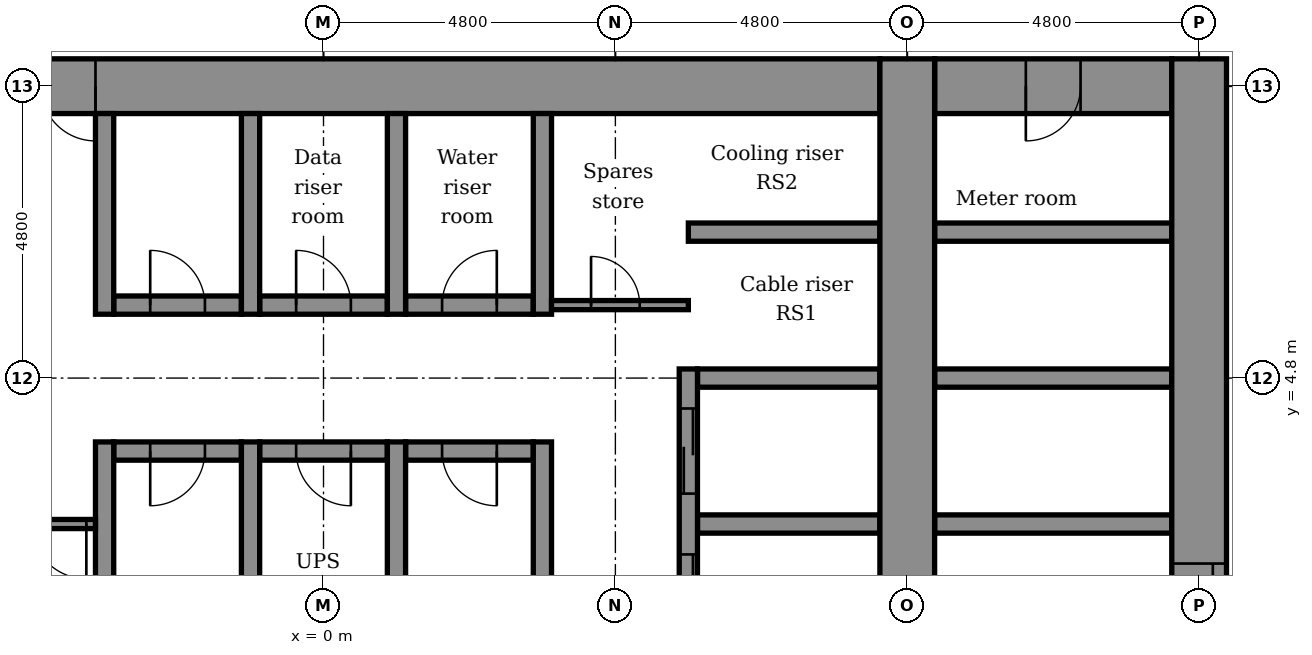
"""IFC4 building model, lengths in metres.
Left out: names, types, materials, properties, quantities, classifications, styles, units other than length and angle.
Written with IfcOpenShell. Run it as: python <this file> out.ifc"""

import sys

from ifc_helpers import new_model, si_unit, direction, frame, frame_2d, origin, place, context, subcontext, project, spatial, rectangle, extrude, element, fill, save


model = new_model("IFC4")
c1 = context("Model", 3, precision=1e-05, world=origin(), true_north=direction((0.0, 1.0)))
c2 = subcontext(c1, "Body", "Model", "MODEL_VIEW")
j1 = project(units=[si_unit("LENGTHUNIT", "METRE"), si_unit("PLANEANGLEUNIT", "RADIAN")], contexts=[c1])
p1 = place(None, origin())
s1 = spatial("IfcSite", under=j1, at=p1, CompositionType="ELEMENT")
p2 = place(p1, origin())
s2 = spatial("IfcBuilding", under=s1, at=p2, CompositionType="ELEMENT")
p3 = place(p2, frame((0.0, 0.0, 113.9)))
s3 = spatial("IfcBuildingStorey", under=s2, at=p3, CompositionType="ELEMENT", Elevation=113.9)
p4 = place(p3, frame((6.15, 2.4, -0.2), z_axis=(0.0, 0.0, 1.0), x_axis=(1.0, 0.0, 0.0)))
e1 = element("IfcWall", 1, at=p4, inside=s3, PredefinedType="STANDARD", context=c2, shape_type="SweptSolid", body=[
    extrude(rectangle(XDim=3.0, YDim=0.3, at=frame_2d((1.5, 0.0))), origin(), (0.0, 0.0, 1.0), 4.5),
])
p5 = place(p3, frame((10.05, 2.4, -0.2), z_axis=(0.0, 0.0, 1.0), x_axis=(1.0, 0.0, 0.0)))
e2 = element("IfcWall", 2, at=p5, inside=s3, PredefinedType="STANDARD", context=c2, shape_type="SweptSolid", body=[
    extrude(rectangle(XDim=3.9, YDim=0.3, at=frame_2d((1.95, 0.0))), origin(), (0.0, 0.0, 1.0), 4.5),
])
p6 = place(p3, frame((-3.45, 3.6, -0.2), z_axis=(0.0, 0.0, 1.0), x_axis=(1.0, 0.0, 0.0)))
e3 = element("IfcWall", 3, at=p6, inside=s3, PredefinedType="STANDARD", context=c2, shape_type="SweptSolid", body=[
    extrude(rectangle(XDim=2.1, YDim=0.3, at=frame_2d((1.05, 0.0))), origin(), (0.0, 0.0, 1.0), 4.5),
])
p7 = place(p6, frame((0.6, 0.0, 0.2)))
e4 = element("IfcOpeningElement", 4, at=p7, cuts=e3, PredefinedType="OPENING", context=c2, shape_type="SweptSolid", body=[
    extrude(rectangle(XDim=0.9, YDim=2.1, at=frame_2d((0.45, 1.05))), frame((0.0, 0.16, 0.0), z_axis=(0.0, -1.0, 0.0), x_axis=(1.0, 0.0, 0.0)), (0.0, 0.0, 1.0), 0.32),
])
p8 = place(p3, frame((-1.05, 3.6, -0.2), z_axis=(0.0, 0.0, 1.0), x_axis=(1.0, 0.0, 0.0)))
e5 = element("IfcWall", 5, at=p8, inside=s3, PredefinedType="STANDARD", context=c2, shape_type="SweptSolid", body=[
    extrude(rectangle(XDim=2.1, YDim=0.3, at=frame_2d((1.05, 0.0))), origin(), (0.0, 0.0, 1.0), 4.5),
])
p9 = place(p8, frame((0.6, 0.0, 0.2)))
e6 = element("IfcOpeningElement", 6, at=p9, cuts=e5, PredefinedType="OPENING", context=c2, shape_type="SweptSolid", body=[
    extrude(rectangle(XDim=0.9, YDim=2.1, at=frame_2d((0.45, 1.05))), frame((0.0, 0.16, 0.0), z_axis=(0.0, -1.0, 0.0), x_axis=(1.0, 0.0, 0.0)), (0.0, 0.0, 1.0), 0.32),
])
p10 = place(p3, frame((1.35, 3.6, -0.2), z_axis=(0.0, 0.0, 1.0), x_axis=(1.0, 0.0, 0.0)))
e7 = element("IfcWall", 7, at=p10, inside=s3, PredefinedType="STANDARD", context=c2, shape_type="SweptSolid", body=[
    extrude(rectangle(XDim=2.1, YDim=0.3, at=frame_2d((1.05, 0.0))), origin(), (0.0, 0.0, 1.0), 4.5),
])
p11 = place(p10, frame((0.6, 0.0, 0.2)))
e8 = element("IfcOpeningElement", 8, at=p11, cuts=e7, PredefinedType="OPENING", context=c2, shape_type="SweptSolid", body=[
    extrude(rectangle(XDim=0.9, YDim=2.1, at=frame_2d((0.45, 1.05))), frame((0.0, 0.16, 0.0), z_axis=(0.0, -1.0, 0.0), x_axis=(1.0, 0.0, 0.0)), (0.0, 0.0, 1.0), 0.32),
])
p12 = place(p3, frame((6.15, 4.8, -0.2), z_axis=(0.0, 0.0, 1.0), x_axis=(1.0, 0.0, 0.0)))
e9 = element("IfcWall", 9, at=p12, inside=s3, PredefinedType="STANDARD", context=c2, shape_type="SweptSolid", body=[
    extrude(rectangle(XDim=3.0, YDim=0.3, at=frame_2d((1.5, 0.0))), origin(), (0.0, 0.0, 1.0), 4.5),
])
p13 = place(p3, frame((10.05, 4.8, -0.2), z_axis=(0.0, 0.0, 1.0), x_axis=(1.0, 0.0, 0.0)))
e10 = element("IfcWall", 10, at=p13, inside=s3, PredefinedType="STANDARD", context=c2, shape_type="SweptSolid", body=[
    extrude(rectangle(XDim=3.9, YDim=0.3, at=frame_2d((1.95, 0.0))), origin(), (0.0, 0.0, 1.0), 4.5),
])
p14 = place(p3, frame((-3.45, 6.0, -0.2), z_axis=(0.0, 0.0, 1.0), x_axis=(1.0, 0.0, 0.0)))
e11 = element("IfcWall", 11, at=p14, inside=s3, PredefinedType="STANDARD", context=c2, shape_type="SweptSolid", body=[
    extrude(rectangle(XDim=2.1, YDim=0.3, at=frame_2d((1.05, 0.0))), origin(), (0.0, 0.0, 1.0), 4.5),
])
p15 = place(p14, frame((0.6, 0.0, 0.2)))
e12 = element("IfcOpeningElement", 12, at=p15, cuts=e11, PredefinedType="OPENING", context=c2, shape_type="SweptSolid", body=[
    extrude(rectangle(XDim=0.9, YDim=2.1, at=frame_2d((0.45, 1.05))), frame((0.0, 0.16, 0.0), z_axis=(0.0, -1.0, 0.0), x_axis=(1.0, 0.0, 0.0)), (0.0, 0.0, 1.0), 0.32),
])
p16 = place(p3, frame((-1.05, 6.0, -0.2), z_axis=(0.0, 0.0, 1.0), x_axis=(1.0, 0.0, 0.0)))
e13 = element("IfcWall", 13, at=p16, inside=s3, PredefinedType="STANDARD", context=c2, shape_type="SweptSolid", body=[
    extrude(rectangle(XDim=2.1, YDim=0.3, at=frame_2d((1.05, 0.0))), origin(), (0.0, 0.0, 1.0), 4.5),
])
p17 = place(p16, frame((0.6, 0.0, 0.2)))
e14 = element("IfcOpeningElement", 14, at=p17, cuts=e13, PredefinedType="OPENING", context=c2, shape_type="SweptSolid", body=[
    extrude(rectangle(XDim=0.9, YDim=2.1, at=frame_2d((0.45, 1.05))), frame((0.0, 0.16, 0.0), z_axis=(0.0, -1.0, 0.0), x_axis=(1.0, 0.0, 0.0)), (0.0, 0.0, 1.0), 0.32),
])
p18 = place(p3, frame((1.35, 6.0, -0.2), z_axis=(0.0, 0.0, 1.0), x_axis=(1.0, 0.0, 0.0)))
e15 = element("IfcWall", 15, at=p18, inside=s3, PredefinedType="STANDARD", context=c2, shape_type="SweptSolid", body=[
    extrude(rectangle(XDim=2.1, YDim=0.3, at=frame_2d((1.05, 0.0))), origin(), (0.0, 0.0, 1.0), 4.5),
])
p19 = place(p18, frame((0.6, 0.0, 0.2)))
e16 = element("IfcOpeningElement", 16, at=p19, cuts=e15, PredefinedType="OPENING", context=c2, shape_type="SweptSolid", body=[
    extrude(rectangle(XDim=0.9, YDim=2.1, at=frame_2d((0.45, 1.05))), frame((0.0, 0.16, 0.0), z_axis=(0.0, -1.0, 0.0), x_axis=(1.0, 0.0, 0.0)), (0.0, 0.0, 1.0), 0.32),
])
p20 = place(p3, frame((6.0, 7.2, -0.2), z_axis=(0.0, 0.0, 1.0), x_axis=(1.0, 0.0, 0.0)))
e17 = element("IfcWall", 17, at=p20, inside=s3, PredefinedType="STANDARD", context=c2, shape_type="SweptSolid", body=[
    extrude(rectangle(XDim=3.15, YDim=0.3, at=frame_2d((1.575, 0.0))), origin(), (0.0, 0.0, 1.0), 4.5),
])
p21 = place(p3, frame((10.05, 7.2, -0.2), z_axis=(0.0, 0.0, 1.0), x_axis=(1.0, 0.0, 0.0)))
e18 = element("IfcWall", 18, at=p21, inside=s3, PredefinedType="STANDARD", context=c2, shape_type="SweptSolid", body=[
    extrude(rectangle(XDim=3.9, YDim=0.3, at=frame_2d((1.95, 0.0))), origin(), (0.0, 0.0, 1.0), 4.5),
])
p22 = place(p3, frame((-5.25, 9.6, -0.2), z_axis=(0.0, 0.0, 1.0), x_axis=(1.0, 0.0, 0.0)))
e19 = element("IfcWall", 19, at=p22, inside=s3, PredefinedType="SHEAR", context=c2, shape_type="SweptSolid", body=[
    extrude(rectangle(XDim=14.4, YDim=0.9, at=frame_2d((7.2, 0.0))), origin(), (0.0, 0.0, 1.0), 4.5),
])
p23 = place(p22, frame((0.6, 0.0, 0.2)))
e20 = element("IfcOpeningElement", 20, at=p23, cuts=e19, PredefinedType="OPENING", context=c2, shape_type="SweptSolid", body=[
    extrude(rectangle(XDim=0.9, YDim=2.1, at=frame_2d((0.45, 1.05))), frame((0.0, 0.46, 0.0), z_axis=(0.0, -1.0, 0.0), x_axis=(1.0, 0.0, 0.0)), (0.0, 0.0, 1.0), 0.92),
])
p24 = place(p3, frame((10.05, 9.6, -0.2), z_axis=(0.0, 0.0, 1.0), x_axis=(1.0, 0.0, 0.0)))
e21 = element("IfcWall", 21, at=p24, inside=s3, PredefinedType="SHEAR", context=c2, shape_type="SweptSolid", body=[
    extrude(rectangle(XDim=3.9, YDim=0.9, at=frame_2d((1.95, 0.0))), origin(), (0.0, 0.0, 1.0), 4.5),
])
p25 = place(p24, frame((1.5, 0.0, 0.2)))
e22 = element("IfcOpeningElement", 22, at=p25, cuts=e21, PredefinedType="OPENING", context=c2, shape_type="SweptSolid", body=[
    extrude(rectangle(XDim=0.9, YDim=2.1, at=frame_2d((0.45, 1.05))), frame((0.0, 0.46, 0.0), z_axis=(0.0, -1.0, 0.0), x_axis=(1.0, 0.0, 0.0)), (0.0, 0.0, 1.0), 0.92),
])
p26 = place(p3, frame((-3.6, -3.75, -0.2), z_axis=(0.0, 0.0, 1.0), x_axis=(0.0, 1.0, 0.0)))
e23 = element("IfcWall", 23, at=p26, inside=s3, PredefinedType="STANDARD", context=c2, shape_type="SweptSolid", body=[
    extrude(rectangle(XDim=7.5, YDim=0.3, at=frame_2d((3.75, 0.0))), origin(), (0.0, 0.0, 1.0), 4.5),
])
p27 = place(p3, frame((-3.6, 5.85, -0.2), z_axis=(0.0, 0.0, 1.0), x_axis=(0.0, 1.0, 0.0)))
e24 = element("IfcWall", 24, at=p27, inside=s3, PredefinedType="STANDARD", context=c2, shape_type="SweptSolid", body=[
    extrude(rectangle(XDim=3.3, YDim=0.3, at=frame_2d((1.65, 0.0))), origin(), (0.0, 0.0, 1.0), 4.5),
])
p28 = place(p3, frame((-1.2, -3.75, -0.2), z_axis=(0.0, 0.0, 1.0), x_axis=(0.0, 1.0, 0.0)))
e25 = element("IfcWall", 25, at=p28, inside=s3, PredefinedType="STANDARD", context=c2, shape_type="SweptSolid", body=[
    extrude(rectangle(XDim=7.5, YDim=0.3, at=frame_2d((3.75, 0.0))), origin(), (0.0, 0.0, 1.0), 4.5),
])
p29 = place(p3, frame((-1.2, 5.85, -0.2), z_axis=(0.0, 0.0, 1.0), x_axis=(0.0, 1.0, 0.0)))
e26 = element("IfcWall", 26, at=p29, inside=s3, PredefinedType="STANDARD", context=c2, shape_type="SweptSolid", body=[
    extrude(rectangle(XDim=3.3, YDim=0.3, at=frame_2d((1.65, 0.0))), origin(), (0.0, 0.0, 1.0), 4.5),
])
p30 = place(p3, frame((1.2, -3.75, -0.2), z_axis=(0.0, 0.0, 1.0), x_axis=(0.0, 1.0, 0.0)))
e27 = element("IfcWall", 27, at=p30, inside=s3, PredefinedType="STANDARD", context=c2, shape_type="SweptSolid", body=[
    extrude(rectangle(XDim=7.5, YDim=0.3, at=frame_2d((3.75, 0.0))), origin(), (0.0, 0.0, 1.0), 4.5),
])
p31 = place(p3, frame((1.2, 5.85, -0.2), z_axis=(0.0, 0.0, 1.0), x_axis=(0.0, 1.0, 0.0)))
e28 = element("IfcWall", 28, at=p31, inside=s3, PredefinedType="STANDARD", context=c2, shape_type="SweptSolid", body=[
    extrude(rectangle(XDim=3.3, YDim=0.3, at=frame_2d((1.65, 0.0))), origin(), (0.0, 0.0, 1.0), 4.5),
])
p32 = place(p3, frame((3.6, -3.75, -0.2), z_axis=(0.0, 0.0, 1.0), x_axis=(0.0, 1.0, 0.0)))
e29 = element("IfcWall", 29, at=p32, inside=s3, PredefinedType="STANDARD", context=c2, shape_type="SweptSolid", body=[
    extrude(rectangle(XDim=7.5, YDim=0.3, at=frame_2d((3.75, 0.0))), origin(), (0.0, 0.0, 1.0), 4.5),
])
p33 = place(p3, frame((3.6, 5.85, -0.2), z_axis=(0.0, 0.0, 1.0), x_axis=(0.0, 1.0, 0.0)))
e30 = element("IfcWall", 30, at=p33, inside=s3, PredefinedType="STANDARD", context=c2, shape_type="SweptSolid", body=[
    extrude(rectangle(XDim=3.3, YDim=0.3, at=frame_2d((1.65, 0.0))), origin(), (0.0, 0.0, 1.0), 4.5),
])
p34 = place(p3, frame((6.0, -2.55, -0.2), z_axis=(0.0, 0.0, 1.0), x_axis=(0.0, 1.0, 0.0)))
e31 = element("IfcWall", 31, at=p34, inside=s3, PredefinedType="STANDARD", context=c2, shape_type="SweptSolid", body=[
    extrude(rectangle(XDim=7.5, YDim=0.3, at=frame_2d((3.75, 0.0))), origin(), (0.0, 0.0, 1.0), 4.5),
])
p35 = place(p34, frame((0.65, 0.0, 0.2)))
e32 = element("IfcOpeningElement", 32, at=p35, cuts=e31, PredefinedType="OPENING", context=c2, shape_type="SweptSolid", body=[
    extrude(rectangle(XDim=1.4, YDim=2.1, at=frame_2d((0.7, 1.05))), frame((0.0, 0.16, 0.0), z_axis=(0.0, -1.0, 0.0), x_axis=(1.0, 0.0, 0.0)), (0.0, 0.0, 1.0), 0.32),
])
p36 = place(p34, frame((3.05, 0.0, 0.2)))
e33 = element("IfcOpeningElement", 33, at=p36, cuts=e31, PredefinedType="OPENING", context=c2, shape_type="SweptSolid", body=[
    extrude(rectangle(XDim=1.4, YDim=2.1, at=frame_2d((0.7, 1.05))), frame((0.0, 0.16, 0.0), z_axis=(0.0, -1.0, 0.0), x_axis=(1.0, 0.0, 0.0)), (0.0, 0.0, 1.0), 0.32),
])
p37 = place(p34, frame((5.45, 0.0, 0.2)))
e34 = element("IfcOpeningElement", 34, at=p37, cuts=e31, PredefinedType="OPENING", context=c2, shape_type="SweptSolid", body=[
    extrude(rectangle(XDim=1.4, YDim=2.1, at=frame_2d((0.7, 1.05))), frame((0.0, 0.16, 0.0), z_axis=(0.0, -1.0, 0.0), x_axis=(1.0, 0.0, 0.0)), (0.0, 0.0, 1.0), 0.32),
])
p38 = place(p3, frame((9.6, -10.15, -0.2), z_axis=(0.0, 0.0, 1.0), x_axis=(0.0, 1.0, 0.0)))
e35 = element("IfcWall", 35, at=p38, inside=s3, PredefinedType="SHEAR", context=c2, shape_type="SweptSolid", body=[
    extrude(rectangle(XDim=20.2, YDim=0.9, at=frame_2d((10.1, 0.0))), origin(), (0.0, 0.0, 1.0), 4.5),
])
p39 = place(p3, frame((14.4, -10.05, -0.2), z_axis=(0.0, 0.0, 1.0), x_axis=(0.0, 1.0, 0.0)))
e36 = element("IfcWall", 36, at=p39, inside=s3, PredefinedType="SHEAR", context=c2, shape_type="SweptSolid", body=[
    extrude(rectangle(XDim=20.1, YDim=0.9, at=frame_2d((10.05, 0.0))), origin(), (0.0, 0.0, 1.0), 4.5),
])
p40 = place(p39, frame((3.5, 0.0, 0.2)))
e37 = element("IfcOpeningElement", 37, at=p40, cuts=e36, PredefinedType="OPENING", context=c2, shape_type="SweptSolid", body=[
    extrude(rectangle(XDim=1.1, YDim=2.1, at=frame_2d((0.55, 1.05))), frame((0.0, 0.46, 0.0), z_axis=(0.0, -1.0, 0.0), x_axis=(1.0, 0.0, 0.0)), (0.0, 0.0, 1.0), 0.92),
])
p41 = place(p39, frame((5.9, 0.0, 0.2)))
e38 = element("IfcOpeningElement", 38, at=p41, cuts=e36, PredefinedType="OPENING", context=c2, shape_type="SweptSolid", body=[
    extrude(rectangle(XDim=1.1, YDim=2.1, at=frame_2d((0.55, 1.05))), frame((0.0, 0.46, 0.0), z_axis=(0.0, -1.0, 0.0), x_axis=(1.0, 0.0, 0.0)), (0.0, 0.0, 1.0), 0.92),
])
p42 = place(p39, frame((8.3, 0.0, 0.2)))
e39 = element("IfcOpeningElement", 39, at=p42, cuts=e36, PredefinedType="OPENING", context=c2, shape_type="SweptSolid", body=[
    extrude(rectangle(XDim=1.1, YDim=2.1, at=frame_2d((0.55, 1.05))), frame((0.0, 0.46, 0.0), z_axis=(0.0, -1.0, 0.0), x_axis=(1.0, 0.0, 0.0)), (0.0, 0.0, 1.0), 0.92),
])
p43 = place(p39, frame((10.7, 0.0, 0.2)))
e40 = element("IfcOpeningElement", 40, at=p43, cuts=e36, PredefinedType="OPENING", context=c2, shape_type="SweptSolid", body=[
    extrude(rectangle(XDim=1.1, YDim=2.1, at=frame_2d((0.55, 1.05))), frame((0.0, 0.46, 0.0), z_axis=(0.0, -1.0, 0.0), x_axis=(1.0, 0.0, 0.0)), (0.0, 0.0, 1.0), 0.92),
])
p44 = place(p3, frame((3.75, 6.0, 0.0), z_axis=(0.0, 0.0, 1.0), x_axis=(1.0, 0.0, 0.0)))
e41 = element("IfcWall", 41, at=p44, inside=s3, PredefinedType="PARTITIONING", context=c2, shape_type="SweptSolid", body=[
    extrude(rectangle(XDim=2.25, YDim=0.15, at=frame_2d((1.125, 0.0))), origin(), (0.0, 0.0, 1.0), 4.3),
])
p45 = place(p44, frame((0.65, 0.0, 0.0)))
e42 = element("IfcOpeningElement", 42, at=p45, cuts=e41, PredefinedType="OPENING", context=c2, shape_type="SweptSolid", body=[
    extrude(rectangle(XDim=0.8, YDim=2.1, at=frame_2d((0.4, 1.05))), frame((0.0, 0.085, 0.0), z_axis=(0.0, -1.0, 0.0), x_axis=(1.0, 0.0, 0.0)), (0.0, 0.0, 1.0), 0.17),
])
p46 = place(p3, frame((-4.95, 2.4, 0.0), z_axis=(0.0, 0.0, 1.0), x_axis=(1.0, 0.0, 0.0)))
e43 = element("IfcWall", 43, at=p46, inside=s3, PredefinedType="PARTITIONING", context=c2, shape_type="SweptSolid", body=[
    extrude(rectangle(XDim=1.2, YDim=0.15, at=frame_2d((0.6, 0.0))), origin(), (0.0, 0.0, 1.0), 4.3),
])
p47 = place(p46, frame((0.15, 0.0, 0.0)))
e44 = element("IfcOpeningElement", 44, at=p47, cuts=e43, PredefinedType="OPENING", context=c2, shape_type="SweptSolid", body=[
    extrude(rectangle(XDim=0.9, YDim=2.1, at=frame_2d((0.45, 1.05))), frame((0.0, 0.085, 0.0), z_axis=(0.0, -1.0, 0.0), x_axis=(1.0, 0.0, 0.0)), (0.0, 0.0, 1.0), 0.17),
])
p48 = place(p45, origin())
e45 = element("IfcDoor", 45, at=p48, inside=s3, OperationType="SINGLE_SWING_LEFT", PredefinedType="DOOR", context=c2, shape_type="SweptSolid", body=[
    extrude(rectangle(XDim=0.8, YDim=2.1, at=frame_2d((0.4, 1.05))), frame((0.0, 0.025, 0.0), z_axis=(0.0, -1.0, 0.0), x_axis=(1.0, 0.0, 0.0)), (0.0, 0.0, 1.0), 0.05),
])
fill(e42, e45)
p49 = place(p36, origin())
e46 = element("IfcDoor", 46, at=p49, inside=s3, OperationType="DOUBLE_DOOR_SLIDING", PredefinedType="DOOR", context=c2, shape_type="SweptSolid", body=[
    extrude(rectangle(XDim=1.4, YDim=2.1, at=frame_2d((0.7, 1.05))), frame((0.0, 0.025, 0.0), z_axis=(0.0, -1.0, 0.0), x_axis=(1.0, 0.0, 0.0)), (0.0, 0.0, 1.0), 0.05),
])
fill(e33, e46)
p50 = place(p37, origin())
e47 = element("IfcDoor", 47, at=p50, inside=s3, OperationType="DOUBLE_DOOR_SLIDING", PredefinedType="DOOR", context=c2, shape_type="SweptSolid", body=[
    extrude(rectangle(XDim=1.4, YDim=2.1, at=frame_2d((0.7, 1.05))), frame((0.0, 0.025, 0.0), z_axis=(0.0, -1.0, 0.0), x_axis=(1.0, 0.0, 0.0)), (0.0, 0.0, 1.0), 0.05),
])
fill(e34, e47)
p51 = place(p43, origin())
e48 = element("IfcDoor", 48, at=p51, inside=s3, OperationType="DOUBLE_DOOR_SLIDING", PredefinedType="DOOR", context=c2, shape_type="SweptSolid", body=[
    extrude(rectangle(XDim=1.1, YDim=2.1, at=frame_2d((0.55, 1.05))), frame((0.0, 0.025, 0.0), z_axis=(0.0, -1.0, 0.0), x_axis=(1.0, 0.0, 0.0)), (0.0, 0.0, 1.0), 0.05),
])
fill(e40, e48)
p52 = place(p15, origin())
e49 = element("IfcDoor", 49, at=p52, inside=s3, OperationType="SINGLE_SWING_LEFT", PredefinedType="DOOR", context=c2, shape_type="SweptSolid", body=[
    extrude(rectangle(XDim=0.9, YDim=2.1, at=frame_2d((0.45, 1.05))), frame((0.0, 0.025, 0.0), z_axis=(0.0, -1.0, 0.0), x_axis=(1.0, 0.0, 0.0)), (0.0, 0.0, 1.0), 0.05),
])
fill(e12, e49)
p53 = place(p17, origin())
e50 = element("IfcDoor", 50, at=p53, inside=s3, OperationType="SINGLE_SWING_LEFT", PredefinedType="DOOR", context=c2, shape_type="SweptSolid", body=[
    extrude(rectangle(XDim=0.9, YDim=2.1, at=frame_2d((0.45, 1.05))), frame((0.0, 0.025, 0.0), z_axis=(0.0, -1.0, 0.0), x_axis=(1.0, 0.0, 0.0)), (0.0, 0.0, 1.0), 0.05),
])
fill(e14, e50)
p54 = place(p19, origin())
e51 = element("IfcDoor", 51, at=p54, inside=s3, OperationType="SINGLE_SWING_RIGHT", PredefinedType="DOOR", context=c2, shape_type="SweptSolid", body=[
    extrude(rectangle(XDim=0.9, YDim=2.1, at=frame_2d((0.45, 1.05))), frame((0.0, 0.025, 0.0), z_axis=(0.0, -1.0, 0.0), x_axis=(1.0, 0.0, 0.0)), (0.0, 0.0, 1.0), 0.05),
])
fill(e16, e51)
p55 = place(p7, frame((0.9, 0.0, 0.0), z_axis=(0.0, 0.0, 1.0), x_axis=(-1.0, 0.0, 0.0)))
e52 = element("IfcDoor", 52, at=p55, inside=s3, OperationType="SINGLE_SWING_LEFT", PredefinedType="DOOR", context=c2, shape_type="SweptSolid", body=[
    extrude(rectangle(XDim=0.9, YDim=2.1, at=frame_2d((0.45, 1.05))), frame((0.0, 0.025, 0.0), z_axis=(0.0, -1.0, 0.0), x_axis=(1.0, 0.0, 0.0)), (0.0, 0.0, 1.0), 0.05),
])
fill(e4, e52)
p56 = place(p9, frame((0.9, 0.0, 0.0), z_axis=(0.0, 0.0, 1.0), x_axis=(-1.0, 0.0, 0.0)))
e53 = element("IfcDoor", 53, at=p56, inside=s3, OperationType="SINGLE_SWING_RIGHT", PredefinedType="DOOR", context=c2, shape_type="SweptSolid", body=[
    extrude(rectangle(XDim=0.9, YDim=2.1, at=frame_2d((0.45, 1.05))), frame((0.0, 0.025, 0.0), z_axis=(0.0, -1.0, 0.0), x_axis=(1.0, 0.0, 0.0)), (0.0, 0.0, 1.0), 0.05),
])
fill(e6, e53)
p57 = place(p11, frame((0.9, 0.0, 0.0), z_axis=(0.0, 0.0, 1.0), x_axis=(-1.0, 0.0, 0.0)))
e54 = element("IfcDoor", 54, at=p57, inside=s3, OperationType="SINGLE_SWING_RIGHT", PredefinedType="DOOR", context=c2, shape_type="SweptSolid", body=[
    extrude(rectangle(XDim=0.9, YDim=2.1, at=frame_2d((0.45, 1.05))), frame((0.0, 0.025, 0.0), z_axis=(0.0, -1.0, 0.0), x_axis=(1.0, 0.0, 0.0)), (0.0, 0.0, 1.0), 0.05),
])
fill(e8, e54)
p58 = place(p25, frame((0.9, 0.0, 0.0), z_axis=(0.0, 0.0, 1.0), x_axis=(-1.0, 0.0, 0.0)))
e55 = element("IfcDoor", 55, at=p58, inside=s3, OperationType="SINGLE_SWING_LEFT", PredefinedType="DOOR", context=c2, shape_type="SweptSolid", body=[
    extrude(rectangle(XDim=0.9, YDim=2.1, at=frame_2d((0.45, 1.05))), frame((0.0, 0.025, 0.0), z_axis=(0.0, -1.0, 0.0), x_axis=(1.0, 0.0, 0.0)), (0.0, 0.0, 1.0), 0.05),
])
fill(e22, e55)
p59 = place(p23, frame((0.9, 0.0, 0.0), z_axis=(0.0, 0.0, 1.0), x_axis=(-1.0, 0.0, 0.0)))
e56 = element("IfcDoor", 56, at=p59, inside=s3, OperationType="SINGLE_SWING_RIGHT", PredefinedType="DOOR", context=c2, shape_type="SweptSolid", body=[
    extrude(rectangle(XDim=0.9, YDim=2.1, at=frame_2d((0.45, 1.05))), frame((0.0, 0.025, 0.0), z_axis=(0.0, -1.0, 0.0), x_axis=(1.0, 0.0, 0.0)), (0.0, 0.0, 1.0), 0.05),
])
fill(e20, e56)
p60 = place(p47, frame((0.9, 0.0, 0.0), z_axis=(0.0, 0.0, 1.0), x_axis=(-1.0, 0.0, 0.0)))
e57 = element("IfcDoor", 57, at=p60, inside=s3, OperationType="SINGLE_SWING_RIGHT", PredefinedType="DOOR", context=c2, shape_type="SweptSolid", body=[
    extrude(rectangle(XDim=0.9, YDim=2.1, at=frame_2d((0.45, 1.05))), frame((0.0, 0.025, 0.0), z_axis=(0.0, -1.0, 0.0), x_axis=(1.0, 0.0, 0.0)), (0.0, 0.0, 1.0), 0.05),
])
fill(e44, e57)
save(model, sys.argv[1])
